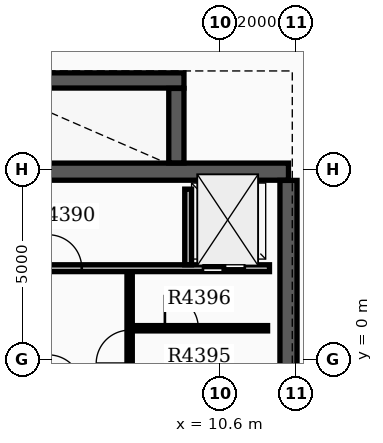
"""IFC4 building model, lengths in metres.
Left out: names, types, materials, properties, quantities, classifications, styles, units other than length and angle.
Written with IfcOpenShell. Run it as: python <this file> out.ifc"""

import sys

from ifc_helpers import new_model, si_unit, direction, frame, frame_2d, origin, place, context, subcontext, project, spatial, rectangle, extrude, element, fill, save


model = new_model("IFC4")
c1 = context("Model", 3, precision=1e-05, world=origin(), true_north=direction((0.0, 1.0)))
c2 = subcontext(c1, "Body", "Model", "MODEL_VIEW")
j1 = project(units=[si_unit("LENGTHUNIT", "METRE"), si_unit("PLANEANGLEUNIT", "RADIAN")], contexts=[c1])
p1 = place(None, origin())
s1 = spatial("IfcSite", under=j1, at=p1, CompositionType="ELEMENT")
p2 = place(p1, origin())
s2 = spatial("IfcBuilding", under=s1, at=p2, CompositionType="ELEMENT")
p3 = place(p2, frame((0.0, 0.0, 277.2)))
s3 = spatial("IfcBuildingStorey", under=s2, at=p3, CompositionType="ELEMENT", Elevation=277.2)
p4 = place(p3, frame((4.0, 4.95, 0.0), z_axis=(0.0, 0.0, 1.0), x_axis=(1.0, 0.0, 0.0)))
e1 = element("IfcWall", 1, at=p4, inside=s3, PredefinedType="SHEAR", context=c2, shape_type="SweptSolid", body=[
    extrude(rectangle(XDim=8.4, YDim=0.45, at=frame_2d((4.2, 0.0))), origin(), (0.0, 0.0, 1.0), 3.7),
])
p5 = place(p3, frame((12.4, -6.62, 0.0), z_axis=(0.0, 0.0, 1.0), x_axis=(0.0, 1.0, 0.0)))
e2 = element("IfcWall", 2, at=p5, inside=s3, PredefinedType="SHEAR", context=c2, shape_type="SweptSolid", body=[
    extrude(rectangle(XDim=11.34, YDim=0.45, at=frame_2d((5.67, 0.0))), origin(), (0.0, 0.0, 1.0), 3.7),
])
p6 = place(p3, frame((4.25, 7.35, 0.0), z_axis=(0.0, 0.0, 1.0), x_axis=(1.0, 0.0, 0.0)))
e3 = element("IfcWall", 3, at=p6, inside=s3, PredefinedType="SHEAR", context=c2, shape_type="SweptSolid", body=[
    extrude(rectangle(XDim=5.4, YDim=0.4, at=frame_2d((2.7, 0.0))), origin(), (0.0, 0.0, 1.0), 3.7),
])
p7 = place(p3, frame((9.45, 5.18, 0.0), z_axis=(0.0, 0.0, 1.0), x_axis=(0.0, 1.0, 0.0)))
e4 = element("IfcWall", 4, at=p7, inside=s3, PredefinedType="SHEAR", context=c2, shape_type="SweptSolid", body=[
    extrude(rectangle(XDim=1.96, YDim=0.4, at=frame_2d((0.98, 0.0))), origin(), (0.0, 0.0, 1.0), 3.7),
])
p8 = place(p3, frame((4.48, 2.41, 0.0), z_axis=(0.0, 0.0, 1.0), x_axis=(1.0, 0.0, 0.0)))
e5 = element("IfcWall", 5, at=p8, inside=s3, PredefinedType="SOLIDWALL", context=c2, shape_type="SweptSolid", body=[
    extrude(rectangle(XDim=7.42, YDim=0.18, at=frame_2d((3.71, 0.0))), origin(), (0.0, 0.0, 1.0), 3.17),
])
p9 = place(p8, frame((5.67, 0.0, 0.0)))
e6 = element("IfcOpeningElement", 6, at=p9, cuts=e5, PredefinedType="OPENING", context=c2, shape_type="SweptSolid", body=[
    extrude(rectangle(XDim=1.1, YDim=2.15, at=frame_2d((0.55, 1.075))), frame((0.0, 0.1, 0.0), z_axis=(0.0, -1.0, 0.0), x_axis=(1.0, 0.0, 0.0)), (0.0, 0.0, 1.0), 0.2),
])
p10 = place(p8, frame((1.6, 0.0, 0.0)))
e7 = element("IfcOpeningElement", 7, at=p10, cuts=e5, PredefinedType="OPENING", context=c2, shape_type="SweptSolid", body=[
    extrude(rectangle(XDim=0.88, YDim=2.1, at=frame_2d((0.44, 1.05))), frame((0.0, 0.1, 0.0), z_axis=(0.0, -1.0, 0.0), x_axis=(1.0, 0.0, 0.0)), (0.0, 0.0, 1.0), 0.2),
])
p11 = place(p3, frame((9.76, 2.5, 0.0), z_axis=(0.0, 0.0, 1.0), x_axis=(0.0, 1.0, 0.0)))
e8 = element("IfcWall", 8, at=p11, inside=s3, PredefinedType="SOLIDWALL", context=c2, shape_type="SweptSolid", body=[
    extrude(rectangle(XDim=1.99, YDim=0.18, at=frame_2d((0.995, 0.0))), origin(), (0.0, 0.0, 1.0), 3.17),
])
p12 = place(p3, frame((8.22, -0.65, 0.0), z_axis=(0.0, 0.0, 1.0), x_axis=(0.0, 1.0, 0.0)))
e9 = element("IfcWall", 9, at=p12, inside=s3, PredefinedType="SOLIDWALL", context=c2, shape_type="SweptSolid", body=[
    extrude(rectangle(XDim=2.96, YDim=0.14, at=frame_2d((1.48, 0.0))), origin(), (0.0, 0.0, 1.0), 3.17),
])
p13 = place(p12, frame((0.55, 0.0, 0.0)))
e10 = element("IfcOpeningElement", 10, at=p13, cuts=e9, PredefinedType="OPENING", context=c2, shape_type="SweptSolid", body=[
    extrude(rectangle(XDim=0.88, YDim=2.1, at=frame_2d((0.44, 1.05))), frame((0.0, 0.08, 0.0), z_axis=(0.0, -1.0, 0.0), x_axis=(1.0, 0.0, 0.0)), (0.0, 0.0, 1.0), 0.16),
])
p14 = place(p3, frame((8.298, 0.83, 0.0), z_axis=(0.0, 0.0, 1.0), x_axis=(1.0, 0.0, 0.0)))
e11 = element("IfcWall", 11, at=p14, inside=s3, PredefinedType="PARTITIONING", context=c2, shape_type="SweptSolid", body=[
    extrude(rectangle(XDim=3.552, YDim=0.14, at=frame_2d((1.776, 0.0))), origin(), (0.0, 0.0, 1.0), 3.17),
])
p15 = place(p14, frame((0.85, 0.0, 0.0)))
e12 = element("IfcOpeningElement", 12, at=p15, cuts=e11, PredefinedType="OPENING", context=c2, shape_type="SweptSolid", body=[
    extrude(rectangle(XDim=0.88, YDim=2.1, at=frame_2d((0.44, 1.05))), frame((0.0, 0.08, 0.0), z_axis=(0.0, -1.0, 0.0), x_axis=(1.0, 0.0, 0.0)), (0.0, 0.0, 1.0), 0.16),
])
p16 = place(p9, origin())
e13 = element("IfcDoor", 13, at=p16, inside=s3, OperationType="DOUBLE_DOOR_SLIDING", PredefinedType="DOOR", context=c2, shape_type="SweptSolid", body=[
    extrude(rectangle(XDim=1.1, YDim=2.15, at=frame_2d((0.55, 1.075))), frame((0.0, 0.025, 0.0), z_axis=(0.0, -1.0, 0.0), x_axis=(1.0, 0.0, 0.0)), (0.0, 0.0, 1.0), 0.05),
])
fill(e6, e13)
p17 = place(p10, origin())
e14 = element("IfcDoor", 14, at=p17, inside=s3, OperationType="SINGLE_SWING_LEFT", PredefinedType="DOOR", context=c2, shape_type="SweptSolid", body=[
    extrude(rectangle(XDim=0.88, YDim=2.1, at=frame_2d((0.44, 1.05))), frame((0.0, 0.025, 0.0), z_axis=(0.0, -1.0, 0.0), x_axis=(1.0, 0.0, 0.0)), (0.0, 0.0, 1.0), 0.05),
])
fill(e7, e14)
p18 = place(p13, origin())
e15 = element("IfcDoor", 15, at=p18, inside=s3, OperationType="SINGLE_SWING_LEFT", PredefinedType="DOOR", context=c2, shape_type="SweptSolid", body=[
    extrude(rectangle(XDim=0.88, YDim=2.1, at=frame_2d((0.44, 1.05))), frame((0.0, 0.025, 0.0), z_axis=(0.0, -1.0, 0.0), x_axis=(1.0, 0.0, 0.0)), (0.0, 0.0, 1.0), 0.05),
])
fill(e10, e15)
p19 = place(p15, origin())
e16 = element("IfcDoor", 16, at=p19, inside=s3, OperationType="SINGLE_SWING_LEFT", PredefinedType="DOOR", context=c2, shape_type="SweptSolid", body=[
    extrude(rectangle(XDim=0.88, YDim=2.1, at=frame_2d((0.44, 1.05))), frame((0.0, 0.025, 0.0), z_axis=(0.0, -1.0, 0.0), x_axis=(1.0, 0.0, 0.0)), (0.0, 0.0, 1.0), 0.05),
])
fill(e12, e16)
save(model, sys.argv[1])
